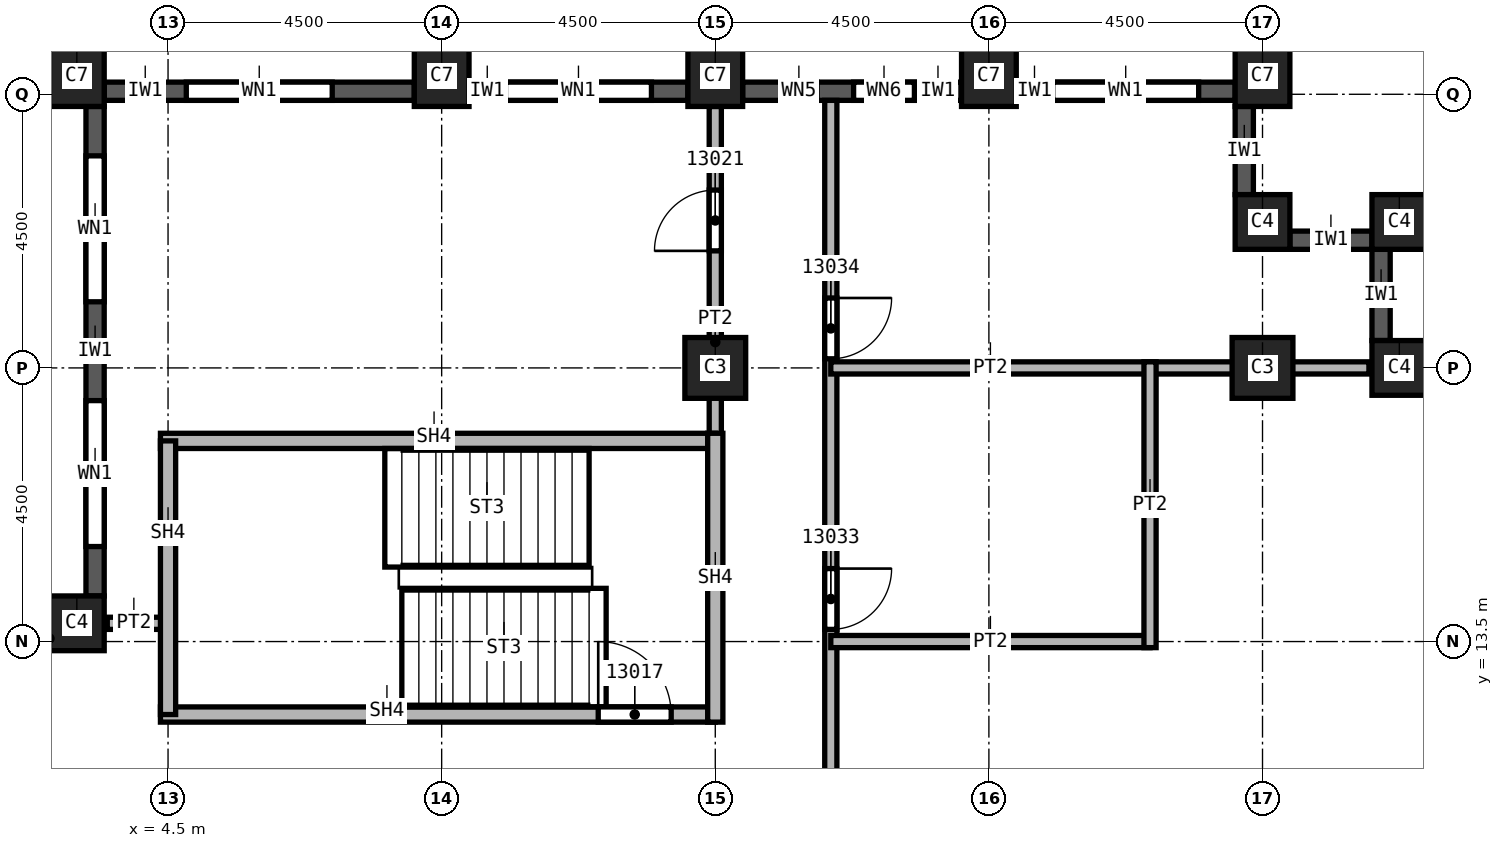
"""IFC4 building model, lengths in metres.
Left out: names, types, materials, properties, quantities, classifications, styles, units other than length and angle.
Written with IfcOpenShell. Run it as: python <this file> out.ifc"""

import sys

from ifc_helpers import new_model, si_unit, direction, frame, frame_2d, origin, origin_2d, place, context, subcontext, project, spatial, rectangle, extrude, element, fill, save


model = new_model("IFC4")
c1 = context("Model", 3, precision=1e-05, world=origin(), true_north=direction((0.0, 1.0)))
c2 = subcontext(c1, "Body", "Model", "MODEL_VIEW")
j1 = project(units=[si_unit("LENGTHUNIT", "METRE"), si_unit("PLANEANGLEUNIT", "RADIAN")], contexts=[c1])
p1 = place(None, origin())
s1 = spatial("IfcSite", under=j1, at=p1, CompositionType="ELEMENT")
p2 = place(p1, origin())
s2 = spatial("IfcBuilding", under=s1, at=p2, CompositionType="ELEMENT")
p3 = place(p2, frame((0.0, 0.0, 208.0)))
s3 = spatial("IfcBuildingStorey", under=s2, at=p3, CompositionType="ELEMENT", Elevation=208.0)
for number, where, z_axis, x_axis in (
    (1, (13.5, 18.0, 0.0), (0.0, 0.0, 1.0), (1.0, 0.0, 0.0)),
    (2, (22.5, 18.0, 0.0), (0.0, 0.0, 1.0), (1.0, 0.0, 0.0)),
):
    element("IfcColumn", number, at=place(p3, frame(where, z_axis=z_axis, x_axis=x_axis)), inside=s3, PredefinedType="COLUMN", context=c2, shape_type="SweptSolid", body=[
        extrude(rectangle(XDim=1.0, YDim=1.0, at=origin_2d()), origin(), (0.0, 0.0, 1.0), 3.72),
    ])
for number, where, z_axis, x_axis in (
    (3, (3.0, 22.8, 0.0), (0.0, 0.0, 1.0), (1.0, 0.0, 0.0)),
    (4, (9.0, 22.8, 0.0), (0.0, 0.0, 1.0), (1.0, 0.0, 0.0)),
    (5, (13.5, 22.8, 0.0), (0.0, 0.0, 1.0), (1.0, 0.0, 0.0)),
    (6, (18.0, 22.8, 0.0), (0.0, 0.0, 1.0), (1.0, 0.0, 0.0)),
    (7, (22.5, 22.8, 0.0), (0.0, 0.0, 1.0), (1.0, 0.0, 0.0)),
):
    element("IfcColumn", number, at=place(p3, frame(where, z_axis=z_axis, x_axis=x_axis)), inside=s3, PredefinedType="COLUMN", context=c2, shape_type="SweptSolid", body=[
        extrude(rectangle(XDim=0.9, YDim=1.0, at=origin_2d()), origin(), (0.0, 0.0, 1.0), 3.72),
    ])
for number, where, z_axis, x_axis in (
    (8, (3.0, 13.8, 0.0), (0.0, 0.0, 1.0), (1.0, 0.0, 0.0)),
    (9, (22.5, 20.4, 0.0), (0.0, 0.0, 1.0), (1.0, 0.0, 0.0)),
    (10, (24.75, 20.4, 0.0), (0.0, 0.0, 1.0), (1.0, 0.0, 0.0)),
    (11, (24.75, 18.0, 0.0), (0.0, 0.0, 1.0), (1.0, 0.0, 0.0)),
):
    element("IfcColumn", number, at=place(p3, frame(where, z_axis=z_axis, x_axis=x_axis)), inside=s3, PredefinedType="COLUMN", context=c2, shape_type="SweptSolid", body=[
        extrude(rectangle(XDim=0.9, YDim=0.9, at=origin_2d()), origin(), (0.0, 0.0, 1.0), 3.72),
    ])
p4 = place(p3, frame((24.45, 18.45, 0.0), z_axis=(0.0, 0.0, 1.0), x_axis=(0.0, 1.0, 0.0)))
e12 = element("IfcWall", 12, at=p4, inside=s3, PredefinedType="SOLIDWALL", context=c2, shape_type="SweptSolid", body=[
    extrude(rectangle(XDim=1.5, YDim=0.3, at=frame_2d((0.75, 0.0))), origin(), (0.0, 0.0, 1.0), 3.12),
])
p5 = place(p3, frame((24.3, 20.1, 0.0), z_axis=(0.0, 0.0, 1.0), x_axis=(-1.0, 0.0, 0.0)))
e13 = element("IfcWall", 13, at=p5, inside=s3, PredefinedType="SOLIDWALL", context=c2, shape_type="SweptSolid", body=[
    extrude(rectangle(XDim=1.35, YDim=0.3, at=frame_2d((0.675, 0.0))), origin(), (0.0, 0.0, 1.0), 3.12),
])
p6 = place(p3, frame((22.2, 20.85, 0.0), z_axis=(0.0, 0.0, 1.0), x_axis=(0.0, 1.0, 0.0)))
e14 = element("IfcWall", 14, at=p6, inside=s3, PredefinedType="SOLIDWALL", context=c2, shape_type="SweptSolid", body=[
    extrude(rectangle(XDim=1.45, YDim=0.3, at=frame_2d((0.725, 0.0))), origin(), (0.0, 0.0, 1.0), 3.12),
])
p7 = place(p3, frame((22.05, 22.55, 0.0), z_axis=(0.0, 0.0, 1.0), x_axis=(-1.0, 0.0, 0.0)))
e15 = element("IfcWall", 15, at=p7, inside=s3, PredefinedType="SOLIDWALL", context=c2, shape_type="SweptSolid", body=[
    extrude(rectangle(XDim=3.6, YDim=0.3, at=frame_2d((1.8, 0.0))), origin(), (0.0, 0.0, 1.0), 3.12),
])
p8 = place(p7, frame((0.6, 0.0, 0.8)))
e16 = element("IfcOpeningElement", 16, at=p8, cuts=e15, PredefinedType="OPENING", context=c2, shape_type="SweptSolid", body=[
    extrude(rectangle(XDim=2.4, YDim=1.95, at=frame_2d((1.2, 0.975))), frame((0.0, 0.15, 0.0), z_axis=(0.0, -1.0, 0.0), x_axis=(1.0, 0.0, 0.0)), (0.0, 0.0, 1.0), 0.3),
])
p9 = place(p3, frame((17.55, 22.55, 0.0), z_axis=(0.0, 0.0, 1.0), x_axis=(-1.0, 0.0, 0.0)))
e17 = element("IfcWall", 17, at=p9, inside=s3, PredefinedType="SOLIDWALL", context=c2, shape_type="SweptSolid", body=[
    extrude(rectangle(XDim=3.6, YDim=0.3, at=frame_2d((1.8, 0.0))), origin(), (0.0, 0.0, 1.0), 3.12),
])
p10 = place(p9, frame((0.775, 0.0, 0.8)))
e18 = element("IfcOpeningElement", 18, at=p10, cuts=e17, PredefinedType="OPENING", context=c2, shape_type="SweptSolid", body=[
    extrude(rectangle(XDim=1.0, YDim=1.95, at=frame_2d((0.5, 0.975))), frame((0.0, 0.15, 0.0), z_axis=(0.0, -1.0, 0.0), x_axis=(1.0, 0.0, 0.0)), (0.0, 0.0, 1.0), 0.3),
])
p11 = place(p9, frame((2.375, 0.0, 0.8)))
e19 = element("IfcOpeningElement", 19, at=p11, cuts=e17, PredefinedType="OPENING", context=c2, shape_type="SweptSolid", body=[
    extrude(rectangle(XDim=0.6, YDim=1.95, at=frame_2d((0.3, 0.975))), frame((0.0, 0.15, 0.0), z_axis=(0.0, -1.0, 0.0), x_axis=(1.0, 0.0, 0.0)), (0.0, 0.0, 1.0), 0.3),
])
p12 = place(p3, frame((13.05, 22.55, 0.0), z_axis=(0.0, 0.0, 1.0), x_axis=(-1.0, 0.0, 0.0)))
e20 = element("IfcWall", 20, at=p12, inside=s3, PredefinedType="SOLIDWALL", context=c2, shape_type="SweptSolid", body=[
    extrude(rectangle(XDim=3.6, YDim=0.3, at=frame_2d((1.8, 0.0))), origin(), (0.0, 0.0, 1.0), 3.12),
])
p13 = place(p12, frame((0.6, 0.0, 0.8)))
e21 = element("IfcOpeningElement", 21, at=p13, cuts=e20, PredefinedType="OPENING", context=c2, shape_type="SweptSolid", body=[
    extrude(rectangle(XDim=2.4, YDim=1.95, at=frame_2d((1.2, 0.975))), frame((0.0, 0.15, 0.0), z_axis=(0.0, -1.0, 0.0), x_axis=(1.0, 0.0, 0.0)), (0.0, 0.0, 1.0), 0.3),
])
p14 = place(p3, frame((8.55, 22.55, 0.0), z_axis=(0.0, 0.0, 1.0), x_axis=(-1.0, 0.0, 0.0)))
e22 = element("IfcWall", 22, at=p14, inside=s3, PredefinedType="SOLIDWALL", context=c2, shape_type="SweptSolid", body=[
    extrude(rectangle(XDim=5.1, YDim=0.3, at=frame_2d((2.55, 0.0))), origin(), (0.0, 0.0, 1.0), 3.12),
])
p15 = place(p14, frame((1.35, 0.0, 0.8)))
e23 = element("IfcOpeningElement", 23, at=p15, cuts=e22, PredefinedType="OPENING", context=c2, shape_type="SweptSolid", body=[
    extrude(rectangle(XDim=2.4, YDim=1.95, at=frame_2d((1.2, 0.975))), frame((0.0, 0.15, 0.0), z_axis=(0.0, -1.0, 0.0), x_axis=(1.0, 0.0, 0.0)), (0.0, 0.0, 1.0), 0.3),
])
p16 = place(p3, frame((3.3, 22.3, 0.0), z_axis=(0.0, 0.0, 1.0), x_axis=(0.0, -1.0, 0.0)))
e24 = element("IfcWall", 24, at=p16, inside=s3, PredefinedType="SOLIDWALL", context=c2, shape_type="SweptSolid", body=[
    extrude(rectangle(XDim=8.05, YDim=0.3, at=frame_2d((4.025, 0.0))), origin(), (0.0, 0.0, 1.0), 3.12),
])
p17 = place(p16, frame((0.812, 0.0, 0.8)))
e25 = element("IfcOpeningElement", 25, at=p17, cuts=e24, PredefinedType="OPENING", context=c2, shape_type="SweptSolid", body=[
    extrude(rectangle(XDim=2.4, YDim=1.95, at=frame_2d((1.2, 0.975))), frame((0.0, 0.15, 0.0), z_axis=(0.0, -1.0, 0.0), x_axis=(1.0, 0.0, 0.0)), (0.0, 0.0, 1.0), 0.3),
])
p18 = place(p16, frame((4.837, 0.0, 0.8)))
e26 = element("IfcOpeningElement", 26, at=p18, cuts=e24, PredefinedType="OPENING", context=c2, shape_type="SweptSolid", body=[
    extrude(rectangle(XDim=2.4, YDim=1.95, at=frame_2d((1.2, 0.975))), frame((0.0, 0.15, 0.0), z_axis=(0.0, -1.0, 0.0), x_axis=(1.0, 0.0, 0.0)), (0.0, 0.0, 1.0), 0.3),
])
p19 = place(p3, frame((3.5, 13.8, 0.0), z_axis=(0.0, 0.0, 1.0), x_axis=(1.0, 0.0, 0.0)))
e27 = element("IfcWall", 27, at=p19, inside=s3, PredefinedType="PARTITIONING", context=c2, shape_type="SweptSolid", body=[
    extrude(rectangle(XDim=0.999, YDim=0.2, at=frame_2d((0.5, 0.0))), origin(), (0.0, 0.0, 1.0), 3.72),
])
p20 = place(p3, frame((13.5, 16.675, 0.0), z_axis=(0.0, 0.0, 1.0), x_axis=(0.0, 1.0, 0.0)))
e28 = element("IfcWall", 28, at=p20, inside=s3, PredefinedType="PARTITIONING", context=c2, shape_type="SweptSolid", body=[
    extrude(rectangle(XDim=5.625, YDim=0.2, at=frame_2d((2.812, 0.0))), origin(), (0.0, 0.0, 1.0), 3.72),
])
p21 = place(p20, frame((3.25, 0.0, 0.0)))
e29 = element("IfcOpeningElement", 29, at=p21, cuts=e28, PredefinedType="OPENING", context=c2, shape_type="SweptSolid", body=[
    extrude(rectangle(XDim=1.0, YDim=2.1, at=frame_2d((0.5, 1.05))), frame((0.0, 0.1, 0.0), z_axis=(0.0, -1.0, 0.0), x_axis=(1.0, 0.0, 0.0)), (0.0, 0.0, 1.0), 0.2),
])
p22 = place(p3, frame((15.4, 22.4, 0.0), z_axis=(0.0, 0.0, 1.0), x_axis=(0.0, -1.0, 0.0)))
e30 = element("IfcWall", 30, at=p22, inside=s3, PredefinedType="PARTITIONING", context=c2, shape_type="SweptSolid", body=[
    extrude(rectangle(XDim=44.8, YDim=0.2, at=frame_2d((22.4, 0.0))), origin(), (0.0, 0.0, 1.0), 3.72),
])
p23 = place(p22, frame((12.5, 0.0, 0.0)))
e31 = element("IfcOpeningElement", 31, at=p23, cuts=e30, PredefinedType="OPENING", context=c2, shape_type="SweptSolid", body=[
    extrude(rectangle(XDim=1.0, YDim=2.1, at=frame_2d((0.5, 1.05))), frame((0.0, 0.1, 0.0), z_axis=(0.0, -1.0, 0.0), x_axis=(1.0, 0.0, 0.0)), (0.0, 0.0, 1.0), 0.2),
])
p24 = place(p22, frame((7.7, 0.0, 0.0)))
e32 = element("IfcOpeningElement", 32, at=p24, cuts=e30, PredefinedType="OPENING", context=c2, shape_type="SweptSolid", body=[
    extrude(rectangle(XDim=1.0, YDim=2.1, at=frame_2d((0.5, 1.05))), frame((0.0, 0.1, 0.0), z_axis=(0.0, -1.0, 0.0), x_axis=(1.0, 0.0, 0.0)), (0.0, 0.0, 1.0), 0.2),
])
p25 = place(p22, frame((3.25, 0.0, 0.0)))
e33 = element("IfcOpeningElement", 33, at=p25, cuts=e30, PredefinedType="OPENING", context=c2, shape_type="SweptSolid", body=[
    extrude(rectangle(XDim=1.0, YDim=2.1, at=frame_2d((0.5, 1.05))), frame((0.0, 0.1, 0.0), z_axis=(0.0, -1.0, 0.0), x_axis=(1.0, 0.0, 0.0)), (0.0, 0.0, 1.0), 0.2),
])
p26 = place(p22, frame((42.05, 0.0, 0.0)))
e34 = element("IfcOpeningElement", 34, at=p26, cuts=e30, PredefinedType="OPENING", context=c2, shape_type="SweptSolid", body=[
    extrude(rectangle(XDim=1.0, YDim=2.1, at=frame_2d((0.5, 1.05))), frame((0.0, 0.1, 0.0), z_axis=(0.0, -1.0, 0.0), x_axis=(1.0, 0.0, 0.0)), (0.0, 0.0, 1.0), 0.2),
])
p27 = place(p22, frame((34.4, 0.0, 0.0)))
e35 = element("IfcOpeningElement", 35, at=p27, cuts=e30, PredefinedType="OPENING", context=c2, shape_type="SweptSolid", body=[
    extrude(rectangle(XDim=1.0, YDim=2.1, at=frame_2d((0.5, 1.05))), frame((0.0, 0.1, 0.0), z_axis=(0.0, -1.0, 0.0), x_axis=(1.0, 0.0, 0.0)), (0.0, 0.0, 1.0), 0.2),
])
p28 = place(p22, frame((27.05, 0.0, 0.0)))
e36 = element("IfcOpeningElement", 36, at=p28, cuts=e30, PredefinedType="OPENING", context=c2, shape_type="SweptSolid", body=[
    extrude(rectangle(XDim=1.0, YDim=2.1, at=frame_2d((0.5, 1.05))), frame((0.0, 0.1, 0.0), z_axis=(0.0, -1.0, 0.0), x_axis=(1.0, 0.0, 0.0)), (0.0, 0.0, 1.0), 0.2),
])
p29 = place(p22, frame((22.55, 0.0, 0.0)))
e37 = element("IfcOpeningElement", 37, at=p29, cuts=e30, PredefinedType="OPENING", context=c2, shape_type="SweptSolid", body=[
    extrude(rectangle(XDim=1.0, YDim=2.1, at=frame_2d((0.5, 1.05))), frame((0.0, 0.1, 0.0), z_axis=(0.0, -1.0, 0.0), x_axis=(1.0, 0.0, 0.0)), (0.0, 0.0, 1.0), 0.2),
])
p30 = place(p3, frame((15.4, 13.5, 0.0), z_axis=(0.0, 0.0, 1.0), x_axis=(1.0, 0.0, 0.0)))
e38 = element("IfcWall", 38, at=p30, inside=s3, PredefinedType="PARTITIONING", context=c2, shape_type="SweptSolid", body=[
    extrude(rectangle(XDim=5.25, YDim=0.2, at=frame_2d((2.625, 0.0))), origin(), (0.0, 0.0, 1.0), 3.72),
])
p31 = place(p3, frame((15.4, 18.0, 0.0), z_axis=(0.0, 0.0, 1.0), x_axis=(1.0, 0.0, 0.0)))
e39 = element("IfcWall", 39, at=p31, inside=s3, PredefinedType="PARTITIONING", context=c2, shape_type="SweptSolid", body=[
    extrude(rectangle(XDim=8.85, YDim=0.2, at=frame_2d((4.425, 0.0))), origin(), (0.0, 0.0, 1.0), 3.72),
])
p32 = place(p3, frame((20.65, 13.4, 0.0), z_axis=(0.0, 0.0, 1.0), x_axis=(0.0, 1.0, 0.0)))
e40 = element("IfcWall", 40, at=p32, inside=s3, PredefinedType="PARTITIONING", context=c2, shape_type="SweptSolid", body=[
    extrude(rectangle(XDim=4.7, YDim=0.2, at=frame_2d((2.35, 0.0))), origin(), (0.0, 0.0, 1.0), 3.72),
])
p33 = place(p3, frame((4.375, 12.3, 0.0), z_axis=(0.0, 0.0, 1.0), x_axis=(1.0, 0.0, 0.0)))
e41 = element("IfcWall", 41, at=p33, inside=s3, PredefinedType="SOLIDWALL", context=c2, shape_type="SweptSolid", body=[
    extrude(rectangle(XDim=9.125, YDim=0.25, at=frame_2d((4.562, 0.0))), origin(), (0.0, 0.0, 1.0), 3.72),
])
p34 = place(p33, frame((7.2, 0.0, 0.0)))
e42 = element("IfcOpeningElement", 42, at=p34, cuts=e41, PredefinedType="OPENING", context=c2, shape_type="SweptSolid", body=[
    extrude(rectangle(XDim=1.2, YDim=2.1, at=frame_2d((0.6, 1.05))), frame((0.0, 0.125, 0.0), z_axis=(0.0, -1.0, 0.0), x_axis=(1.0, 0.0, 0.0)), (0.0, 0.0, 1.0), 0.25),
])
p35 = place(p3, frame((4.375, 16.8, 0.0), z_axis=(0.0, 0.0, 1.0), x_axis=(1.0, 0.0, 0.0)))
e43 = element("IfcWall", 43, at=p35, inside=s3, PredefinedType="SOLIDWALL", context=c2, shape_type="SweptSolid", body=[
    extrude(rectangle(XDim=9.125, YDim=0.25, at=frame_2d((4.562, 0.0))), origin(), (0.0, 0.0, 1.0), 3.72),
])
p36 = place(p3, frame((4.5, 12.3, 0.0), z_axis=(0.0, 0.0, 1.0), x_axis=(0.0, 1.0, 0.0)))
e44 = element("IfcWall", 44, at=p36, inside=s3, PredefinedType="SOLIDWALL", context=c2, shape_type="SweptSolid", body=[
    extrude(rectangle(XDim=4.5, YDim=0.25, at=frame_2d((2.25, 0.0))), origin(), (0.0, 0.0, 1.0), 3.72),
])
p37 = place(p3, frame((13.5, 12.175, 0.0), z_axis=(0.0, 0.0, 1.0), x_axis=(0.0, 1.0, 0.0)))
e45 = element("IfcWall", 45, at=p37, inside=s3, PredefinedType="SOLIDWALL", context=c2, shape_type="SweptSolid", body=[
    extrude(rectangle(XDim=4.75, YDim=0.25, at=frame_2d((2.375, 0.0))), origin(), (0.0, 0.0, 1.0), 3.72),
])
p38 = place(p8, origin())
e46 = element("IfcWindow", 46, at=p38, inside=s3, PartitioningType="SINGLE_PANEL", PredefinedType="WINDOW", context=c2, shape_type="SweptSolid", body=[
    extrude(rectangle(XDim=2.4, YDim=1.95, at=frame_2d((1.2, 0.975))), frame((0.0, 0.03, 0.0), z_axis=(0.0, -1.0, 0.0), x_axis=(1.0, 0.0, 0.0)), (0.0, 0.0, 1.0), 0.06),
])
fill(e16, e46)
p39 = place(p13, origin())
e47 = element("IfcWindow", 47, at=p39, inside=s3, PartitioningType="SINGLE_PANEL", PredefinedType="WINDOW", context=c2, shape_type="SweptSolid", body=[
    extrude(rectangle(XDim=2.4, YDim=1.95, at=frame_2d((1.2, 0.975))), frame((0.0, 0.03, 0.0), z_axis=(0.0, -1.0, 0.0), x_axis=(1.0, 0.0, 0.0)), (0.0, 0.0, 1.0), 0.06),
])
fill(e21, e47)
p40 = place(p15, origin())
e48 = element("IfcWindow", 48, at=p40, inside=s3, PartitioningType="SINGLE_PANEL", PredefinedType="WINDOW", context=c2, shape_type="SweptSolid", body=[
    extrude(rectangle(XDim=2.4, YDim=1.95, at=frame_2d((1.2, 0.975))), frame((0.0, 0.03, 0.0), z_axis=(0.0, -1.0, 0.0), x_axis=(1.0, 0.0, 0.0)), (0.0, 0.0, 1.0), 0.06),
])
fill(e23, e48)
p41 = place(p17, origin())
e49 = element("IfcWindow", 49, at=p41, inside=s3, PartitioningType="SINGLE_PANEL", PredefinedType="WINDOW", context=c2, shape_type="SweptSolid", body=[
    extrude(rectangle(XDim=2.4, YDim=1.95, at=frame_2d((1.2, 0.975))), frame((0.0, 0.03, 0.0), z_axis=(0.0, -1.0, 0.0), x_axis=(1.0, 0.0, 0.0)), (0.0, 0.0, 1.0), 0.06),
])
fill(e25, e49)
p42 = place(p18, origin())
e50 = element("IfcWindow", 50, at=p42, inside=s3, PartitioningType="SINGLE_PANEL", PredefinedType="WINDOW", context=c2, shape_type="SweptSolid", body=[
    extrude(rectangle(XDim=2.4, YDim=1.95, at=frame_2d((1.2, 0.975))), frame((0.0, 0.03, 0.0), z_axis=(0.0, -1.0, 0.0), x_axis=(1.0, 0.0, 0.0)), (0.0, 0.0, 1.0), 0.06),
])
fill(e26, e50)
p43 = place(p34, origin())
e51 = element("IfcDoor", 51, at=p43, inside=s3, OperationType="SINGLE_SWING_RIGHT", PredefinedType="DOOR", context=c2, shape_type="SweptSolid", body=[
    extrude(rectangle(XDim=1.2, YDim=2.1, at=frame_2d((0.6, 1.05))), frame((0.0, 0.025, 0.0), z_axis=(0.0, -1.0, 0.0), x_axis=(1.0, 0.0, 0.0)), (0.0, 0.0, 1.0), 0.05),
])
fill(e42, e51)
p44 = place(p21, origin())
e52 = element("IfcDoor", 52, at=p44, inside=s3, OperationType="SINGLE_SWING_RIGHT", PredefinedType="DOOR", context=c2, shape_type="SweptSolid", body=[
    extrude(rectangle(XDim=1.0, YDim=2.1, at=frame_2d((0.5, 1.05))), frame((0.0, 0.025, 0.0), z_axis=(0.0, -1.0, 0.0), x_axis=(1.0, 0.0, 0.0)), (0.0, 0.0, 1.0), 0.05),
])
fill(e29, e52)
p45 = place(p24, origin())
e53 = element("IfcDoor", 53, at=p45, inside=s3, OperationType="SINGLE_SWING_RIGHT", PredefinedType="DOOR", context=c2, shape_type="SweptSolid", body=[
    extrude(rectangle(XDim=1.0, YDim=2.1, at=frame_2d((0.5, 1.05))), frame((0.0, 0.025, 0.0), z_axis=(0.0, -1.0, 0.0), x_axis=(1.0, 0.0, 0.0)), (0.0, 0.0, 1.0), 0.05),
])
fill(e32, e53)
p46 = place(p25, origin())
e54 = element("IfcDoor", 54, at=p46, inside=s3, OperationType="SINGLE_SWING_LEFT", PredefinedType="DOOR", context=c2, shape_type="SweptSolid", body=[
    extrude(rectangle(XDim=1.0, YDim=2.1, at=frame_2d((0.5, 1.05))), frame((0.0, 0.025, 0.0), z_axis=(0.0, -1.0, 0.0), x_axis=(1.0, 0.0, 0.0)), (0.0, 0.0, 1.0), 0.05),
])
fill(e33, e54)
p47 = place(p10, origin())
e55 = element("IfcWindow", 55, at=p47, inside=s3, PartitioningType="SINGLE_PANEL", PredefinedType="WINDOW", context=c2, shape_type="SweptSolid", body=[
    extrude(rectangle(XDim=1.0, YDim=1.95, at=frame_2d((0.5, 0.975))), frame((0.0, 0.03, 0.0), z_axis=(0.0, -1.0, 0.0), x_axis=(1.0, 0.0, 0.0)), (0.0, 0.0, 1.0), 0.06),
])
fill(e18, e55)
p48 = place(p11, origin())
e56 = element("IfcWindow", 56, at=p48, inside=s3, PartitioningType="SINGLE_PANEL", PredefinedType="WINDOW", context=c2, shape_type="SweptSolid", body=[
    extrude(rectangle(XDim=0.6, YDim=1.95, at=frame_2d((0.3, 0.975))), frame((0.0, 0.03, 0.0), z_axis=(0.0, -1.0, 0.0), x_axis=(1.0, 0.0, 0.0)), (0.0, 0.0, 1.0), 0.06),
])
fill(e19, e56)
save(model, sys.argv[1])
